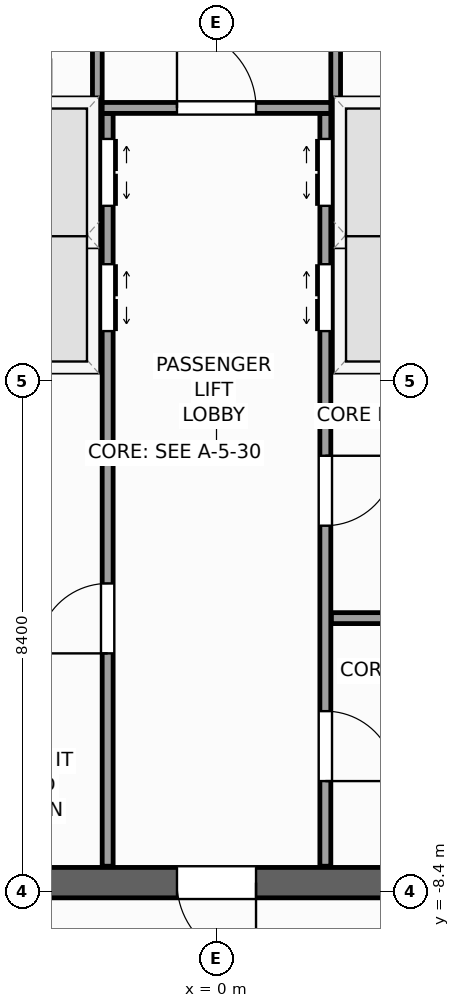
"""IFC4 building model, lengths in metres.
Left out: names, types, materials, properties, quantities, classifications, styles, units other than length and angle.
Written with IfcOpenShell. Run it as: python <this file> out.ifc"""

import sys

from ifc_helpers import new_model, si_unit, direction, frame, frame_2d, origin, place, context, subcontext, project, spatial, rectangle, extrude, source, transform, mapped, element, fill, save


model = new_model("IFC4")
c1 = context("Model", 3, precision=1e-05, world=origin(), true_north=direction((0.0, 1.0)))
c2 = subcontext(c1, "Body", "Model", "MODEL_VIEW")
j1 = project(units=[si_unit("LENGTHUNIT", "METRE"), si_unit("PLANEANGLEUNIT", "RADIAN")], contexts=[c1])
p1 = place(None, origin())
s1 = spatial("IfcSite", under=j1, at=p1, CompositionType="ELEMENT")
p2 = place(p1, origin())
s2 = spatial("IfcBuilding", under=s1, at=p2, CompositionType="ELEMENT")
p3 = place(p2, frame((0.0, 0.0, 312.0)))
s3 = spatial("IfcBuildingStorey", under=s2, at=p3, CompositionType="ELEMENT", Elevation=312.0)
p4 = place(p3, frame((-8.5, -8.25, 0.0), z_axis=(0.0, 0.0, 1.0), x_axis=(1.0, 0.0, 0.0)))
e1 = element("IfcWall", 1, at=p4, inside=s3, PredefinedType="SHEAR", context=c2, shape_type="SweptSolid", body=[
    extrude(rectangle(XDim=17.0, YDim=0.5, at=frame_2d((8.5, 0.0))), origin(), (0.0, 0.0, 1.0), 4.8),
])
p5 = place(p4, frame((7.85, 0.0, 0.0)))
e2 = element("IfcOpeningElement", 2, at=p5, cuts=e1, PredefinedType="OPENING", context=c2, shape_type="SweptSolid", body=[
    extrude(rectangle(XDim=1.3, YDim=2.2, at=frame_2d((0.65, 1.1))), frame((0.0, 0.26, 0.0), z_axis=(0.0, -1.0, 0.0), x_axis=(1.0, 0.0, 0.0)), (0.0, 0.0, 1.0), 0.52),
])
p6 = place(p3, frame((-1.79, -7.98, 0.0), z_axis=(0.0, 0.0, 1.0), x_axis=(0.0, 1.0, 0.0)))
e3 = element("IfcWall", 3, at=p6, inside=s3, PredefinedType="PARTITIONING", context=c2, shape_type="SweptSolid", body=[
    extrude(rectangle(XDim=12.38, YDim=0.18, at=frame_2d((6.19, 0.0))), origin(), (0.0, 0.0, 1.0), 4.55),
])
p7 = place(p6, frame((8.8, 0.0, 0.0)))
e4 = element("IfcOpeningElement", 4, at=p7, cuts=e3, PredefinedType="OPENING", context=c2, shape_type="SweptSolid", body=[
    extrude(rectangle(XDim=1.1, YDim=2.2, at=frame_2d((0.55, 1.1))), frame((0.0, 0.1, 0.0), z_axis=(0.0, -1.0, 0.0), x_axis=(1.0, 0.0, 0.0)), (0.0, 0.0, 1.0), 0.2),
])
p8 = place(p6, frame((10.86, 0.0, 0.0)))
e5 = element("IfcOpeningElement", 5, at=p8, cuts=e3, PredefinedType="OPENING", context=c2, shape_type="SweptSolid", body=[
    extrude(rectangle(XDim=1.1, YDim=2.2, at=frame_2d((0.55, 1.1))), frame((0.0, 0.1, 0.0), z_axis=(0.0, -1.0, 0.0), x_axis=(1.0, 0.0, 0.0)), (0.0, 0.0, 1.0), 0.2),
])
p9 = place(p6, frame((3.5, 0.0, 0.0)))
e6 = element("IfcOpeningElement", 6, at=p9, cuts=e3, PredefinedType="OPENING", context=c2, shape_type="SweptSolid", body=[
    extrude(rectangle(XDim=1.15, YDim=2.25, at=frame_2d((0.575, 1.125))), frame((0.0, 0.1, 0.0), z_axis=(0.0, -1.0, 0.0), x_axis=(1.0, 0.0, 0.0)), (0.0, 0.0, 1.0), 0.2),
])
p10 = place(p3, frame((1.79, -7.98, 0.0), z_axis=(0.0, 0.0, 1.0), x_axis=(0.0, 1.0, 0.0)))
e7 = element("IfcWall", 7, at=p10, inside=s3, PredefinedType="PARTITIONING", context=c2, shape_type="SweptSolid", body=[
    extrude(rectangle(XDim=12.38, YDim=0.18, at=frame_2d((6.19, 0.0))), origin(), (0.0, 0.0, 1.0), 4.55),
])
p11 = place(p10, frame((8.8, 0.0, 0.0)))
e8 = element("IfcOpeningElement", 8, at=p11, cuts=e7, PredefinedType="OPENING", context=c2, shape_type="SweptSolid", body=[
    extrude(rectangle(XDim=1.1, YDim=2.2, at=frame_2d((0.55, 1.1))), frame((0.0, 0.1, 0.0), z_axis=(0.0, -1.0, 0.0), x_axis=(1.0, 0.0, 0.0)), (0.0, 0.0, 1.0), 0.2),
])
p12 = place(p10, frame((10.86, 0.0, 0.0)))
e9 = element("IfcOpeningElement", 9, at=p12, cuts=e7, PredefinedType="OPENING", context=c2, shape_type="SweptSolid", body=[
    extrude(rectangle(XDim=1.1, YDim=2.2, at=frame_2d((0.55, 1.1))), frame((0.0, 0.1, 0.0), z_axis=(0.0, -1.0, 0.0), x_axis=(1.0, 0.0, 0.0)), (0.0, 0.0, 1.0), 0.2),
])
p13 = place(p10, frame((1.4, 0.0, 0.0)))
e10 = element("IfcOpeningElement", 10, at=p13, cuts=e7, PredefinedType="OPENING", context=c2, shape_type="SweptSolid", body=[
    extrude(rectangle(XDim=1.15, YDim=2.25, at=frame_2d((0.575, 1.125))), frame((0.0, 0.1, 0.0), z_axis=(0.0, -1.0, 0.0), x_axis=(1.0, 0.0, 0.0)), (0.0, 0.0, 1.0), 0.2),
])
p14 = place(p10, frame((5.6, 0.0, 0.0)))
e11 = element("IfcOpeningElement", 11, at=p14, cuts=e7, PredefinedType="OPENING", context=c2, shape_type="SweptSolid", body=[
    extrude(rectangle(XDim=1.15, YDim=2.25, at=frame_2d((0.575, 1.125))), frame((0.0, 0.1, 0.0), z_axis=(0.0, -1.0, 0.0), x_axis=(1.0, 0.0, 0.0)), (0.0, 0.0, 1.0), 0.2),
])
p15 = place(p3, frame((-1.88, 4.49, 0.0), z_axis=(0.0, 0.0, 1.0), x_axis=(1.0, 0.0, 0.0)))
e12 = element("IfcWall", 12, at=p15, inside=s3, PredefinedType="PARTITIONING", context=c2, shape_type="SweptSolid", body=[
    extrude(rectangle(XDim=3.76, YDim=0.18, at=frame_2d((1.88, 0.0))), origin(), (0.0, 0.0, 1.0), 4.55),
])
p16 = place(p15, frame((1.23, 0.0, 0.0)))
e13 = element("IfcOpeningElement", 13, at=p16, cuts=e12, PredefinedType="OPENING", context=c2, shape_type="SweptSolid", body=[
    extrude(rectangle(XDim=1.3, YDim=2.2, at=frame_2d((0.65, 1.1))), frame((0.0, 0.1, 0.0), z_axis=(0.0, -1.0, 0.0), x_axis=(1.0, 0.0, 0.0)), (0.0, 0.0, 1.0), 0.2),
])
for number, where, z_axis, x_axis in (
    (14, (1.89, -3.9, 0.0), (0.0, 0.0, 1.0), (1.0, 0.0, 0.0)),
    (15, (-4.17, 0.3, 0.0), (0.0, 0.0, 1.0), (1.0, 0.0, 0.0)),
    (16, (1.89, 0.3, 0.0), (0.0, 0.0, 1.0), (1.0, 0.0, 0.0)),
    (17, (-4.17, 4.49, 0.0), (0.0, 0.0, 1.0), (1.0, 0.0, 0.0)),
    (18, (1.89, 4.49, 0.0), (0.0, 0.0, 1.0), (1.0, 0.0, 0.0)),
):
    element("IfcWall", number, at=place(p3, frame(where, z_axis=z_axis, x_axis=x_axis)), inside=s3, PredefinedType="PARTITIONING", context=c2, shape_type="SweptSolid", body=[
        extrude(rectangle(XDim=2.28, YDim=0.18, at=frame_2d((1.14, 0.0))), origin(), (0.0, 0.0, 1.0), 4.55),
    ])
for number, where, z_axis, x_axis in (
    (19, (-4.16, 2.4, 0.0), (0.0, 0.0, 1.0), (1.0, 0.0, 0.0)),
    (20, (1.9, 2.4, 0.0), (0.0, 0.0, 1.0), (1.0, 0.0, 0.0)),
):
    element("IfcWall", number, at=place(p3, frame(where, z_axis=z_axis, x_axis=x_axis)), inside=s3, PredefinedType="PARTITIONING", context=c2, shape_type="SweptSolid", body=[
        extrude(rectangle(XDim=2.26, YDim=0.12, at=frame_2d((1.13, 0.0))), origin(), (0.0, 0.0, 1.0), 4.55),
    ])
p17 = place(p3, frame((-1.96, 4.58, 0.0), z_axis=(0.0, 0.0, 1.0), x_axis=(0.0, 1.0, 0.0)))
e21 = element("IfcWall", 21, at=p17, inside=s3, PredefinedType="PARTITIONING", context=c2, shape_type="SweptSolid", body=[
    extrude(rectangle(XDim=3.4, YDim=0.16, at=frame_2d((1.7, 0.0))), origin(), (0.0, 0.0, 1.0), 4.55),
])
p18 = place(p17, frame((1.67, 0.0, 0.0)))
e22 = element("IfcOpeningElement", 22, at=p18, cuts=e21, PredefinedType="OPENING", context=c2, shape_type="SweptSolid", body=[
    extrude(rectangle(XDim=1.1, YDim=2.2, at=frame_2d((0.55, 1.1))), frame((0.0, 0.09, 0.0), z_axis=(0.0, -1.0, 0.0), x_axis=(1.0, 0.0, 0.0)), (0.0, 0.0, 1.0), 0.18),
])
p19 = place(p3, frame((1.96, 4.58, 0.0), z_axis=(0.0, 0.0, 1.0), x_axis=(0.0, 1.0, 0.0)))
e23 = element("IfcWall", 23, at=p19, inside=s3, PredefinedType="PARTITIONING", context=c2, shape_type="SweptSolid", body=[
    extrude(rectangle(XDim=3.4, YDim=0.16, at=frame_2d((1.7, 0.0))), origin(), (0.0, 0.0, 1.0), 4.55),
])
p20 = place(p19, frame((1.67, 0.0, 0.0)))
e24 = element("IfcOpeningElement", 24, at=p20, cuts=e23, PredefinedType="OPENING", context=c2, shape_type="SweptSolid", body=[
    extrude(rectangle(XDim=1.1, YDim=2.2, at=frame_2d((0.55, 1.1))), frame((0.0, 0.09, 0.0), z_axis=(0.0, -1.0, 0.0), x_axis=(1.0, 0.0, 0.0)), (0.0, 0.0, 1.0), 0.18),
])
m1 = source(origin(), c2, "Body", "SweptSolid", [
    extrude(rectangle(XDim=1.3, YDim=2.2, at=frame_2d((0.65, 1.1))), frame((0.0, 0.025, 0.0), z_axis=(0.0, -1.0, 0.0), x_axis=(1.0, 0.0, 0.0)), (0.0, 0.0, 1.0), 0.05),
])
p21 = place(p5, frame((1.3, 0.0, 0.0), z_axis=(0.0, 0.0, 1.0), x_axis=(-1.0, 0.0, 0.0)))
e25 = element("IfcDoor", 25, at=p21, inside=s3, OperationType="SINGLE_SWING_RIGHT", PredefinedType="DOOR", context=c2, shape_type="MappedRepresentation", body=[
    mapped(m1, transform((0.0, 0.0, 0.0), scale=1.0)),
])
fill(e2, e25)
m2 = source(origin(), c2, "Body", "SweptSolid", [
    extrude(rectangle(XDim=1.1, YDim=2.2, at=frame_2d((0.55, 1.1))), frame((0.0, 0.025, 0.0), z_axis=(0.0, -1.0, 0.0), x_axis=(1.0, 0.0, 0.0)), (0.0, 0.0, 1.0), 0.05),
])
p22 = place(p7, frame((1.1, 0.0, 0.0), z_axis=(0.0, 0.0, 1.0), x_axis=(-1.0, 0.0, 0.0)))
e26 = element("IfcDoor", 26, at=p22, inside=s3, OperationType="DOUBLE_DOOR_SLIDING", PredefinedType="DOOR", context=c2, shape_type="MappedRepresentation", body=[
    mapped(m2, transform((0.0, 0.0, 0.0), scale=1.0)),
])
fill(e4, e26)
p23 = place(p8, frame((1.1, 0.0, 0.0), z_axis=(0.0, 0.0, 1.0), x_axis=(-1.0, 0.0, 0.0)))
e27 = element("IfcDoor", 27, at=p23, inside=s3, OperationType="DOUBLE_DOOR_SLIDING", PredefinedType="DOOR", context=c2, shape_type="MappedRepresentation", body=[
    mapped(m2, transform((0.0, 0.0, 0.0), scale=1.0)),
])
fill(e5, e27)
p24 = place(p11, origin())
e28 = element("IfcDoor", 28, at=p24, inside=s3, OperationType="DOUBLE_DOOR_SLIDING", PredefinedType="DOOR", context=c2, shape_type="MappedRepresentation", body=[
    mapped(m2, transform((0.0, 0.0, 0.0), scale=1.0)),
])
fill(e8, e28)
p25 = place(p12, origin())
e29 = element("IfcDoor", 29, at=p25, inside=s3, OperationType="DOUBLE_DOOR_SLIDING", PredefinedType="DOOR", context=c2, shape_type="MappedRepresentation", body=[
    mapped(m2, transform((0.0, 0.0, 0.0), scale=1.0)),
])
fill(e9, e29)
m3 = source(origin(), c2, "Body", "SweptSolid", [
    extrude(rectangle(XDim=1.15, YDim=2.25, at=frame_2d((0.575, 1.125))), frame((0.0, 0.025, 0.0), z_axis=(0.0, -1.0, 0.0), x_axis=(1.0, 0.0, 0.0)), (0.0, 0.0, 1.0), 0.05),
])
p26 = place(p9, origin())
e30 = element("IfcDoor", 30, at=p26, inside=s3, OperationType="SINGLE_SWING_LEFT", PredefinedType="DOOR", context=c2, shape_type="MappedRepresentation", body=[
    mapped(m3, transform((0.0, 0.0, 0.0), scale=1.0)),
])
fill(e6, e30)
p27 = place(p13, frame((1.15, 0.0, 0.0), z_axis=(0.0, 0.0, 1.0), x_axis=(-1.0, 0.0, 0.0)))
e31 = element("IfcDoor", 31, at=p27, inside=s3, OperationType="SINGLE_SWING_LEFT", PredefinedType="DOOR", context=c2, shape_type="MappedRepresentation", body=[
    mapped(m3, transform((0.0, 0.0, 0.0), scale=1.0)),
])
fill(e10, e31)
p28 = place(p14, frame((1.15, 0.0, 0.0), z_axis=(0.0, 0.0, 1.0), x_axis=(-1.0, 0.0, 0.0)))
e32 = element("IfcDoor", 32, at=p28, inside=s3, OperationType="SINGLE_SWING_RIGHT", PredefinedType="DOOR", context=c2, shape_type="MappedRepresentation", body=[
    mapped(m3, transform((0.0, 0.0, 0.0), scale=1.0)),
])
fill(e11, e32)
p29 = place(p16, origin())
e33 = element("IfcDoor", 33, at=p29, inside=s3, OperationType="SINGLE_SWING_LEFT", PredefinedType="DOOR", context=c2, shape_type="MappedRepresentation", body=[
    mapped(m1, transform((0.0, 0.0, 0.0), scale=1.0)),
])
fill(e13, e33)
save(model, sys.argv[1])
